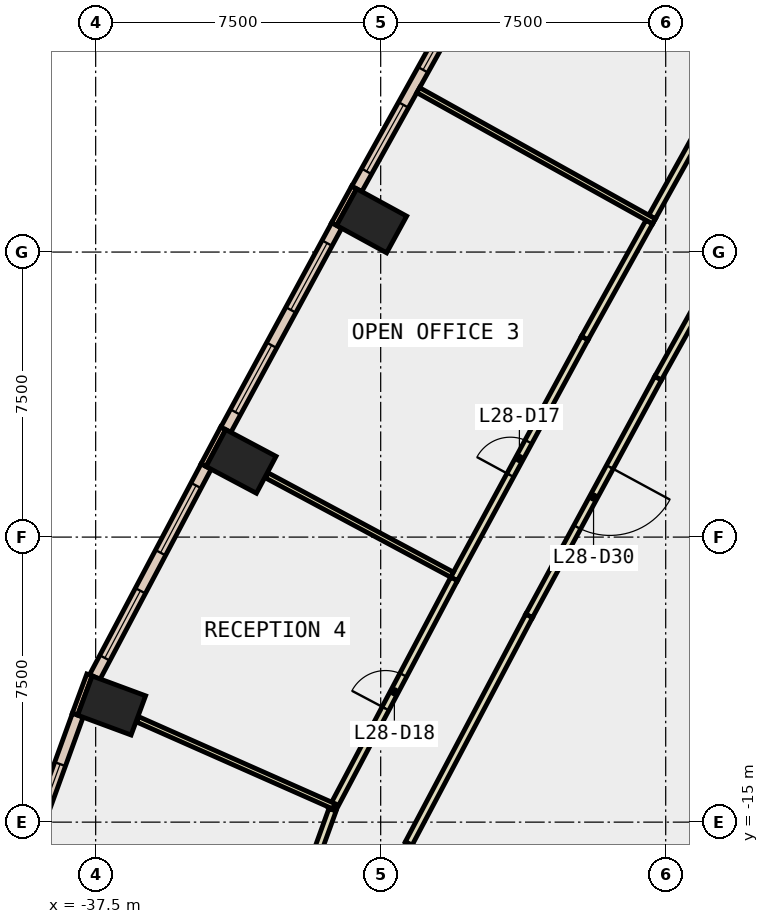
"""IFC4 building model, lengths in metres.
Left out: names, types, materials, properties, quantities, classifications, styles, units other than length and angle.
Written with IfcOpenShell. Run it as: python <this file> out.ifc"""

import sys

from ifc_helpers import new_model, si_unit, direction, frame, frame_2d, origin, origin_2d, place, context, subcontext, project, spatial, rectangle, extrude, element, fill, save


model = new_model("IFC4")
c1 = context("Model", 3, precision=1e-05, world=origin(), true_north=direction((0.0, 1.0)))
c2 = subcontext(c1, "Body", "Model", "MODEL_VIEW")
j1 = project(units=[si_unit("LENGTHUNIT", "METRE"), si_unit("PLANEANGLEUNIT", "RADIAN")], contexts=[c1])
p1 = place(None, origin())
s1 = spatial("IfcSite", under=j1, at=p1, CompositionType="ELEMENT")
p2 = place(p1, origin())
s2 = spatial("IfcBuilding", under=s1, at=p2, CompositionType="ELEMENT")
p3 = place(p2, frame((0.0, 0.0, 128.6)))
s3 = spatial("IfcBuildingStorey", under=s2, at=p3, CompositionType="ELEMENT", Elevation=128.6)
for number, where, z_axis, x_axis in (
    (1, (-30.238, 0.822, -0.4), (0.0, 0.0, 1.0), (0.48, 0.877, 0.0)),
    (2, (-33.674, -5.509, -0.4), (0.0, 0.0, 1.0), (0.469, 0.883, 0.0)),
    (3, (-37.08, -11.931, -0.4), (0.0, 0.0, 1.0), (0.347, 0.938, 0.0)),
):
    element("IfcColumn", number, at=place(p3, frame(where, z_axis=z_axis, x_axis=x_axis)), inside=s3, PredefinedType="COLUMN", context=c2, shape_type="SweptSolid", body=[
        extrude(rectangle(XDim=1.1, YDim=1.5, at=origin_2d()), origin(), (0.0, 0.0, 1.0), 4.0),
    ])
p4 = place(p3, frame((-30.698, 1.701, 0.0), z_axis=(0.0, 0.0, 1.0), x_axis=(-0.479737645119, -0.877411985247, 0.0)))
e4 = element("IfcWall", 4, at=p4, inside=s3, PredefinedType="STANDARD", context=c2, shape_type="SweptSolid", body=[
    extrude(rectangle(XDim=1.101, YDim=0.15, at=frame_2d((0.55, 0.0))), origin(), (0.0, 0.0, 1.0), 3.6),
])
p5 = place(p3, frame((-34.145, -4.637, 0.0), z_axis=(0.0, 0.0, 1.0), x_axis=(-0.46919310775, -0.883095593716, 0.0)))
e5 = element("IfcWall", 5, at=p5, inside=s3, PredefinedType="STANDARD", context=c2, shape_type="SweptSolid", body=[
    extrude(rectangle(XDim=1.099, YDim=0.15, at=frame_2d((0.55, 0.0))), origin(), (0.0, 0.0, 1.0), 3.6),
])
p6 = place(p3, frame((-37.663, -11.128, 0.0), z_axis=(0.0, 0.0, 1.0), x_axis=(-0.347010833361, -0.937861120598, 0.0)))
e6 = element("IfcWall", 6, at=p6, inside=s3, PredefinedType="STANDARD", context=c2, shape_type="SweptSolid", body=[
    extrude(rectangle(XDim=1.1, YDim=0.15, at=frame_2d((0.55, 0.0))), origin(), (0.0, 0.0, 1.0), 3.6),
])
p7 = place(p3, frame((-27.656, 7.005, 0.0), z_axis=(0.0, 0.0, 1.0), x_axis=(-0.486229342917, -0.873831234327, 0.0)))
e7 = element("IfcWall", 7, at=p7, inside=s3, PredefinedType="STANDARD", context=c2, shape_type="SweptSolid", body=[
    extrude(rectangle(XDim=6.114, YDim=0.3, at=frame_2d((3.057, 0.0))), origin(), (0.0, 0.0, 1.0), 3.6),
])
p8 = place(p7, frame((0.529, 0.0, 0.9)))
e8 = element("IfcOpeningElement", 8, at=p8, cuts=e7, PredefinedType="OPENING", context=c2, shape_type="SweptSolid", body=[
    extrude(rectangle(XDim=2.0, YDim=2.6, at=frame_2d((1.0, 1.3))), frame((0.0, 0.16, 0.0), z_axis=(0.0, -1.0, 0.0), x_axis=(1.0, 0.0, 0.0)), (0.0, 0.0, 1.0), 0.32),
])
p9 = place(p7, frame((3.586, 0.0, 0.9)))
e9 = element("IfcOpeningElement", 9, at=p9, cuts=e7, PredefinedType="OPENING", context=c2, shape_type="SweptSolid", body=[
    extrude(rectangle(XDim=2.0, YDim=2.6, at=frame_2d((1.0, 1.3))), frame((0.0, 0.16, 0.0), z_axis=(0.0, -1.0, 0.0), x_axis=(1.0, 0.0, 0.0)), (0.0, 0.0, 1.0), 0.32),
])
p10 = place(p3, frame((-31.158, 0.7, 0.0), z_axis=(0.0, 0.0, 1.0), x_axis=(-0.476982616152, -0.878912728255, 0.0)))
e10 = element("IfcWall", 10, at=p10, inside=s3, PredefinedType="STANDARD", context=c2, shape_type="SweptSolid", body=[
    extrude(rectangle(XDim=6.115, YDim=0.3, at=frame_2d((3.058, 0.0))), origin(), (0.0, 0.0, 1.0), 3.6),
])
p11 = place(p10, frame((0.529, 0.0, 0.9)))
e11 = element("IfcOpeningElement", 11, at=p11, cuts=e10, PredefinedType="OPENING", context=c2, shape_type="SweptSolid", body=[
    extrude(rectangle(XDim=2.0, YDim=2.6, at=frame_2d((1.0, 1.3))), frame((0.0, 0.16, 0.0), z_axis=(0.0, -1.0, 0.0), x_axis=(1.0, 0.0, 0.0)), (0.0, 0.0, 1.0), 0.32),
])
p12 = place(p10, frame((3.587, 0.0, 0.9)))
e12 = element("IfcOpeningElement", 12, at=p12, cuts=e10, PredefinedType="OPENING", context=c2, shape_type="SweptSolid", body=[
    extrude(rectangle(XDim=2.0, YDim=2.6, at=frame_2d((1.0, 1.3))), frame((0.0, 0.16, 0.0), z_axis=(0.0, -1.0, 0.0), x_axis=(1.0, 0.0, 0.0)), (0.0, 0.0, 1.0), 0.32),
])
p13 = place(p3, frame((-34.593, -5.643, 0.0), z_axis=(0.0, 0.0, 1.0), x_axis=(-0.467654949391, -0.883911108828, 0.0)))
e13 = element("IfcWall", 13, at=p13, inside=s3, PredefinedType="STANDARD", context=c2, shape_type="SweptSolid", body=[
    extrude(rectangle(XDim=6.265, YDim=0.3, at=frame_2d((3.133, 0.0))), origin(), (0.0, 0.0, 1.0), 3.6),
])
p14 = place(p13, frame((0.566, 0.0, 0.9)))
e14 = element("IfcOpeningElement", 14, at=p14, cuts=e13, PredefinedType="OPENING", context=c2, shape_type="SweptSolid", body=[
    extrude(rectangle(XDim=2.0, YDim=2.6, at=frame_2d((1.0, 1.3))), frame((0.0, 0.16, 0.0), z_axis=(0.0, -1.0, 0.0), x_axis=(1.0, 0.0, 0.0)), (0.0, 0.0, 1.0), 0.32),
])
p15 = place(p13, frame((3.699, 0.0, 0.9)))
e15 = element("IfcOpeningElement", 15, at=p15, cuts=e13, PredefinedType="OPENING", context=c2, shape_type="SweptSolid", body=[
    extrude(rectangle(XDim=2.0, YDim=2.6, at=frame_2d((1.0, 1.3))), frame((0.0, 0.16, 0.0), z_axis=(0.0, -1.0, 0.0), x_axis=(1.0, 0.0, 0.0)), (0.0, 0.0, 1.0), 0.32),
])
p16 = place(p3, frame((-37.97, -12.186, 0.0), z_axis=(0.0, 0.0, 1.0), x_axis=(-0.340477955209, -0.940252499075, 0.0)))
e16 = element("IfcWall", 16, at=p16, inside=s3, PredefinedType="STANDARD", context=c2, shape_type="SweptSolid", body=[
    extrude(rectangle(XDim=4.138, YDim=0.3, at=frame_2d((2.069, 0.0))), origin(), (0.0, 0.0, 1.0), 3.6),
])
p17 = place(p16, frame((1.369, 0.0, 0.9)))
e17 = element("IfcOpeningElement", 17, at=p17, cuts=e16, PredefinedType="OPENING", context=c2, shape_type="SweptSolid", body=[
    extrude(rectangle(XDim=1.4, YDim=2.6, at=frame_2d((0.7, 1.3))), frame((0.0, 0.16, 0.0), z_axis=(0.0, -1.0, 0.0), x_axis=(1.0, 0.0, 0.0)), (0.0, 0.0, 1.0), 0.32),
])
p18 = place(p3, frame((-19.243, 2.894, 0.0), z_axis=(0.0, 0.0, 1.0), x_axis=(-0.486304341235, -0.873789498504, 0.0)))
e18 = element("IfcWall", 18, at=p18, inside=s3, PredefinedType="PARTITIONING", context=c2, shape_type="SweptSolid", body=[
    extrude(rectangle(XDim=7.113, YDim=0.2, at=frame_2d((3.556, 0.0))), origin(), (0.0, 0.0, 1.0), 3.6),
])
p19 = place(p3, frame((-22.702, -3.321, 0.0), z_axis=(0.0, 0.0, 1.0), x_axis=(-0.476941907079, -0.878934819695, 0.0)))
e19 = element("IfcWall", 19, at=p19, inside=s3, PredefinedType="PARTITIONING", context=c2, shape_type="SweptSolid", body=[
    extrude(rectangle(XDim=7.114, YDim=0.2, at=frame_2d((3.557, 0.0))), origin(), (0.0, 0.0, 1.0), 3.6),
])
p20 = place(p19, frame((2.657, 0.0, 0.0)))
e20 = element("IfcOpeningElement", 20, at=p20, cuts=e19, PredefinedType="OPENING", context=c2, shape_type="SweptSolid", body=[
    extrude(rectangle(XDim=1.8, YDim=2.1, at=frame_2d((0.9, 1.05))), frame((0.0, 0.11, 0.0), z_axis=(0.0, -1.0, 0.0), x_axis=(1.0, 0.0, 0.0)), (0.0, 0.0, 1.0), 0.22),
])
p21 = place(p3, frame((-26.095, -9.574, 0.0), z_axis=(0.0, 0.0, 1.0), x_axis=(-0.467631129673, -0.883923710826, 0.0)))
e21 = element("IfcWall", 21, at=p21, inside=s3, PredefinedType="PARTITIONING", context=c2, shape_type="SweptSolid", body=[
    extrude(rectangle(XDim=6.777, YDim=0.2, at=frame_2d((3.388, 0.0))), origin(), (0.0, 0.0, 1.0), 3.6),
])
p22 = place(p3, frame((-29.251, -15.569, 0.0), z_axis=(0.0, 0.0, 1.0), x_axis=(-0.340403936609, -0.940279298901, 0.0)))
e22 = element("IfcWall", 22, at=p22, inside=s3, PredefinedType="PARTITIONING", context=c2, shape_type="SweptSolid", body=[
    extrude(rectangle(XDim=1.904, YDim=0.2, at=frame_2d((0.952, 0.0))), origin(), (0.0, 0.0, 1.0), 3.6),
])
p23 = place(p3, frame((-22.859, 0.922, 0.0), z_axis=(0.0, 0.0, 1.0), x_axis=(0.486390484578, 0.873741550181, 0.0)))
e23 = element("IfcWall", 23, at=p23, inside=s3, PredefinedType="PARTITIONING", context=c2, shape_type="SweptSolid", body=[
    extrude(rectangle(XDim=3.493, YDim=0.2, at=frame_2d((1.747, 0.0))), origin(), (0.0, 0.0, 1.0), 3.6),
])
p24 = place(p3, frame((-28.07, -8.601, 0.0), z_axis=(0.0, 0.0, 1.0), x_axis=(0.476979808397, 0.878914252007, 0.0)))
e24 = element("IfcWall", 24, at=p24, inside=s3, PredefinedType="PARTITIONING", context=c2, shape_type="SweptSolid", body=[
    extrude(rectangle(XDim=7.212, YDim=0.2, at=frame_2d((3.606, 0.0))), origin(), (0.0, 0.0, 1.0), 3.6),
])
p25 = place(p24, frame((3.106, 0.0, 0.0)))
e25 = element("IfcOpeningElement", 25, at=p25, cuts=e24, PredefinedType="OPENING", context=c2, shape_type="SweptSolid", body=[
    extrude(rectangle(XDim=1.0, YDim=2.1, at=frame_2d((0.5, 1.05))), frame((0.0, 0.11, 0.0), z_axis=(0.0, -1.0, 0.0), x_axis=(1.0, 0.0, 0.0)), (0.0, 0.0, 1.0), 0.22),
])
p26 = place(p3, frame((-24.63, -2.262, 0.0), z_axis=(0.0, 0.0, 1.0), x_axis=(0.486058237491, 0.873926421255, 0.0)))
e26 = element("IfcWall", 26, at=p26, inside=s3, PredefinedType="PARTITIONING", context=c2, shape_type="SweptSolid", body=[
    extrude(rectangle(XDim=3.493, YDim=0.2, at=frame_2d((1.747, 0.0))), origin(), (0.0, 0.0, 1.0), 3.6),
])
p27 = place(p3, frame((-31.28, -14.67, 0.0), z_axis=(0.0, 0.0, 1.0), x_axis=(0.4676622466, 0.883907248022, 0.0)))
e27 = element("IfcWall", 27, at=p27, inside=s3, PredefinedType="PARTITIONING", context=c2, shape_type="SweptSolid", body=[
    extrude(rectangle(XDim=6.866, YDim=0.2, at=frame_2d((3.433, 0.0))), origin(), (0.0, 0.0, 1.0), 3.6),
])
p28 = place(p27, frame((3.008, 0.0, 0.0)))
e28 = element("IfcOpeningElement", 28, at=p28, cuts=e27, PredefinedType="OPENING", context=c2, shape_type="SweptSolid", body=[
    extrude(rectangle(XDim=1.0, YDim=2.1, at=frame_2d((0.5, 1.05))), frame((0.0, 0.11, 0.0), z_axis=(0.0, -1.0, 0.0), x_axis=(1.0, 0.0, 0.0)), (0.0, 0.0, 1.0), 0.22),
])
p29 = place(p3, frame((-32.192, -17.229, 0.0), z_axis=(0.0, 0.0, 1.0), x_axis=(0.340269739222, 0.940327870782, 0.0)))
e29 = element("IfcWall", 29, at=p29, inside=s3, PredefinedType="PARTITIONING", context=c2, shape_type="SweptSolid", body=[
    extrude(rectangle(XDim=2.715, YDim=0.2, at=frame_2d((1.357, 0.0))), origin(), (0.0, 0.0, 1.0), 3.6),
])
p30 = place(p3, frame((-22.808, 0.808, 0.0), z_axis=(0.0, 0.0, 1.0), x_axis=(-0.873839159938, 0.486215099066, 0.0)))
e30 = element("IfcWall", 30, at=p30, inside=s3, PredefinedType="PARTITIONING", context=c2, shape_type="SweptSolid", body=[
    extrude(rectangle(XDim=7.1, YDim=0.15, at=frame_2d((3.55, 0.0))), origin(), (0.0, 0.0, 1.0), 3.6),
])
p31 = place(p3, frame((-28.123, -8.488, 0.0), z_axis=(0.0, 0.0, 1.0), x_axis=(-0.881406449288, 0.472358625573, 0.0)))
e31 = element("IfcWall", 31, at=p31, inside=s3, PredefinedType="PARTITIONING", context=c2, shape_type="SweptSolid", body=[
    extrude(rectangle(XDim=5.53, YDim=0.15, at=frame_2d((2.765, 0.0))), origin(), (0.0, 0.0, 1.0), 3.6),
])
p32 = place(p3, frame((-31.233, -14.582, 0.0), z_axis=(0.0, 0.0, 1.0), x_axis=(-0.914317360249, 0.404998474994, 0.0)))
e32 = element("IfcWall", 32, at=p32, inside=s3, PredefinedType="PARTITIONING", context=c2, shape_type="SweptSolid", body=[
    extrude(rectangle(XDim=5.645, YDim=0.15, at=frame_2d((2.822, 0.0))), origin(), (0.0, 0.0, 1.0), 3.6),
])
p33 = place(p8, origin())
e33 = element("IfcWindow", 33, at=p33, inside=s3, PartitioningType="SINGLE_PANEL", PredefinedType="WINDOW", context=c2, shape_type="SweptSolid", body=[
    extrude(rectangle(XDim=2.0, YDim=2.6, at=frame_2d((1.0, 1.3))), frame((0.0, 0.03, 0.0), z_axis=(0.0, -1.0, 0.0), x_axis=(1.0, 0.0, 0.0)), (0.0, 0.0, 1.0), 0.06),
])
fill(e8, e33)
p34 = place(p9, origin())
e34 = element("IfcWindow", 34, at=p34, inside=s3, PartitioningType="SINGLE_PANEL", PredefinedType="WINDOW", context=c2, shape_type="SweptSolid", body=[
    extrude(rectangle(XDim=2.0, YDim=2.6, at=frame_2d((1.0, 1.3))), frame((0.0, 0.03, 0.0), z_axis=(0.0, -1.0, 0.0), x_axis=(1.0, 0.0, 0.0)), (0.0, 0.0, 1.0), 0.06),
])
fill(e9, e34)
p35 = place(p11, origin())
e35 = element("IfcWindow", 35, at=p35, inside=s3, PartitioningType="SINGLE_PANEL", PredefinedType="WINDOW", context=c2, shape_type="SweptSolid", body=[
    extrude(rectangle(XDim=2.0, YDim=2.6, at=frame_2d((1.0, 1.3))), frame((0.0, 0.03, 0.0), z_axis=(0.0, -1.0, 0.0), x_axis=(1.0, 0.0, 0.0)), (0.0, 0.0, 1.0), 0.06),
])
fill(e11, e35)
p36 = place(p12, origin())
e36 = element("IfcWindow", 36, at=p36, inside=s3, PartitioningType="SINGLE_PANEL", PredefinedType="WINDOW", context=c2, shape_type="SweptSolid", body=[
    extrude(rectangle(XDim=2.0, YDim=2.6, at=frame_2d((1.0, 1.3))), frame((0.0, 0.03, 0.0), z_axis=(0.0, -1.0, 0.0), x_axis=(1.0, 0.0, 0.0)), (0.0, 0.0, 1.0), 0.06),
])
fill(e12, e36)
p37 = place(p14, origin())
e37 = element("IfcWindow", 37, at=p37, inside=s3, PartitioningType="SINGLE_PANEL", PredefinedType="WINDOW", context=c2, shape_type="SweptSolid", body=[
    extrude(rectangle(XDim=2.0, YDim=2.6, at=frame_2d((1.0, 1.3))), frame((0.0, 0.03, 0.0), z_axis=(0.0, -1.0, 0.0), x_axis=(1.0, 0.0, 0.0)), (0.0, 0.0, 1.0), 0.06),
])
fill(e14, e37)
p38 = place(p15, origin())
e38 = element("IfcWindow", 38, at=p38, inside=s3, PartitioningType="SINGLE_PANEL", PredefinedType="WINDOW", context=c2, shape_type="SweptSolid", body=[
    extrude(rectangle(XDim=2.0, YDim=2.6, at=frame_2d((1.0, 1.3))), frame((0.0, 0.03, 0.0), z_axis=(0.0, -1.0, 0.0), x_axis=(1.0, 0.0, 0.0)), (0.0, 0.0, 1.0), 0.06),
])
fill(e15, e38)
p39 = place(p17, origin())
e39 = element("IfcWindow", 39, at=p39, inside=s3, PartitioningType="SINGLE_PANEL", PredefinedType="WINDOW", context=c2, shape_type="SweptSolid", body=[
    extrude(rectangle(XDim=1.4, YDim=2.6, at=frame_2d((0.7, 1.3))), frame((0.0, 0.03, 0.0), z_axis=(0.0, -1.0, 0.0), x_axis=(1.0, 0.0, 0.0)), (0.0, 0.0, 1.0), 0.06),
])
fill(e17, e39)
p40 = place(p25, origin())
e40 = element("IfcDoor", 40, at=p40, inside=s3, OperationType="SINGLE_SWING_RIGHT", PredefinedType="DOOR", context=c2, shape_type="SweptSolid", body=[
    extrude(rectangle(XDim=1.0, YDim=2.1, at=frame_2d((0.5, 1.05))), frame((0.0, 0.025, 0.0), z_axis=(0.0, -1.0, 0.0), x_axis=(1.0, 0.0, 0.0)), (0.0, 0.0, 1.0), 0.05),
])
fill(e25, e40)
p41 = place(p28, origin())
e41 = element("IfcDoor", 41, at=p41, inside=s3, OperationType="SINGLE_SWING_LEFT", PredefinedType="DOOR", context=c2, shape_type="SweptSolid", body=[
    extrude(rectangle(XDim=1.0, YDim=2.1, at=frame_2d((0.5, 1.05))), frame((0.0, 0.025, 0.0), z_axis=(0.0, -1.0, 0.0), x_axis=(1.0, 0.0, 0.0)), (0.0, 0.0, 1.0), 0.05),
])
fill(e28, e41)
p42 = place(p20, origin())
e42 = element("IfcDoor", 42, at=p42, inside=s3, OperationType="DOUBLE_DOOR_SINGLE_SWING", PredefinedType="DOOR", context=c2, shape_type="SweptSolid", body=[
    extrude(rectangle(XDim=1.8, YDim=2.1, at=frame_2d((0.9, 1.05))), frame((0.0, 0.025, 0.0), z_axis=(0.0, -1.0, 0.0), x_axis=(1.0, 0.0, 0.0)), (0.0, 0.0, 1.0), 0.05),
])
fill(e20, e42)
save(model, sys.argv[1])
